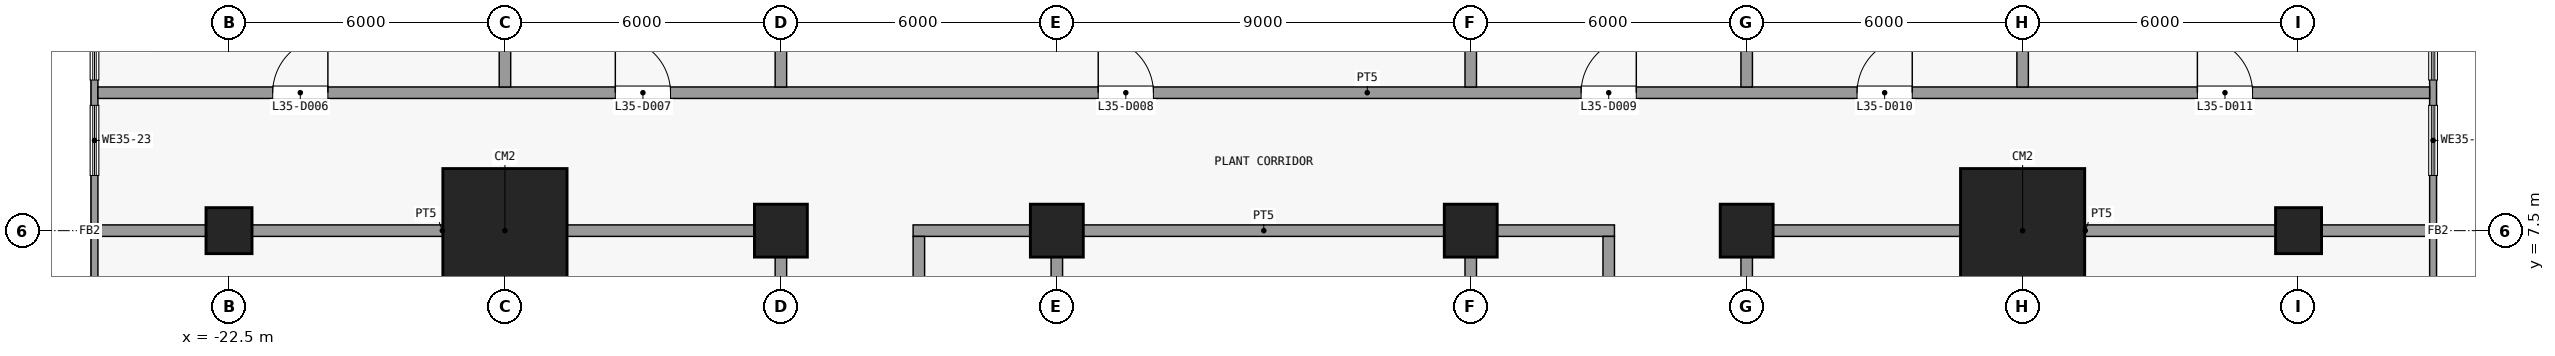
"""IFC4 building model, lengths in metres.
Left out: names, types, materials, properties, quantities, classifications, styles, units other than length and angle.
Written with IfcOpenShell. Run it as: python <this file> out.ifc"""

import sys

from ifc_helpers import new_model, si_unit, direction, frame, frame_2d, origin, origin_2d, place, context, subcontext, project, spatial, rectangle, extrude, element, fill, save


model = new_model("IFC4")
c1 = context("Model", 3, precision=1e-05, world=origin(), true_north=direction((0.0, 1.0)))
c2 = subcontext(c1, "Body", "Model", "MODEL_VIEW")
j1 = project(units=[si_unit("LENGTHUNIT", "METRE"), si_unit("PLANEANGLEUNIT", "RADIAN")], contexts=[c1])
p1 = place(None, origin())
s1 = spatial("IfcSite", under=j1, at=p1, CompositionType="ELEMENT")
p2 = place(p1, origin())
s2 = spatial("IfcBuilding", under=s1, at=p2, CompositionType="ELEMENT")
p3 = place(p2, frame((0.0, 0.0, 143.9)))
s3 = spatial("IfcBuildingStorey", under=s2, at=p3, CompositionType="ELEMENT", Elevation=143.9)
p4 = place(p3, frame((-22.5, 7.5, 0.0), z_axis=(0.0, 0.0, 1.0), x_axis=(1.0, 0.0, 0.0)))
e1 = element("IfcColumn", 1, at=p4, inside=s3, PredefinedType="COLUMN", context=c2, shape_type="SweptSolid", body=[
    extrude(rectangle(XDim=1.0, YDim=1.0, at=origin_2d()), origin(), (0.0, 0.0, 1.0), 5.4),
])
p5 = place(p3, frame((-16.5, 7.5, 0.0), z_axis=(0.0, 0.0, 1.0), x_axis=(1.0, 0.0, 0.0)))
e2 = element("IfcColumn", 2, at=p5, inside=s3, PredefinedType="COLUMN", context=c2, shape_type="SweptSolid", body=[
    extrude(rectangle(XDim=2.7, YDim=2.7, at=origin_2d()), origin(), (0.0, 0.0, 1.0), 5.4),
])
for number, where, z_axis, x_axis in (
    (3, (-10.5, 7.5, 0.0), (0.0, 0.0, 1.0), (1.0, 0.0, 0.0)),
    (4, (-4.5, 7.5, 0.0), (0.0, 0.0, 1.0), (1.0, 0.0, 0.0)),
    (5, (4.5, 7.5, 0.0), (0.0, 0.0, 1.0), (1.0, 0.0, 0.0)),
    (6, (10.5, 7.5, 0.0), (0.0, 0.0, 1.0), (1.0, 0.0, 0.0)),
):
    element("IfcColumn", number, at=place(p3, frame(where, z_axis=z_axis, x_axis=x_axis)), inside=s3, PredefinedType="COLUMN", context=c2, shape_type="SweptSolid", body=[
        extrude(rectangle(XDim=1.15, YDim=1.15, at=origin_2d()), origin(), (0.0, 0.0, 1.0), 5.4),
    ])
p6 = place(p3, frame((16.5, 7.5, 0.0), z_axis=(0.0, 0.0, 1.0), x_axis=(1.0, 0.0, 0.0)))
e7 = element("IfcColumn", 7, at=p6, inside=s3, PredefinedType="COLUMN", context=c2, shape_type="SweptSolid", body=[
    extrude(rectangle(XDim=2.7, YDim=2.7, at=origin_2d()), origin(), (0.0, 0.0, 1.0), 5.4),
])
p7 = place(p3, frame((22.5, 7.5, 0.0), z_axis=(0.0, 0.0, 1.0), x_axis=(1.0, 0.0, 0.0)))
e8 = element("IfcColumn", 8, at=p7, inside=s3, PredefinedType="COLUMN", context=c2, shape_type="SweptSolid", body=[
    extrude(rectangle(XDim=1.0, YDim=1.0, at=origin_2d()), origin(), (0.0, 0.0, 1.0), 5.4),
])
p8 = place(p3, frame((25.425, 18.85, 0.0), z_axis=(0.0, 0.0, 1.0), x_axis=(0.0, -1.0, 0.0)))
e9 = element("IfcWall", 9, at=p8, inside=s3, PredefinedType="SOLIDWALL", context=c2, shape_type="SweptSolid", body=[
    extrude(rectangle(XDim=40.7, YDim=0.15, at=frame_2d((20.35, 0.0))), origin(), (0.0, 0.0, 1.0), 5.0),
])
p9 = place(p8, frame((34.725, 0.0, 1.2)))
e10 = element("IfcOpeningElement", 10, at=p9, cuts=e9, PredefinedType="OPENING", context=c2, shape_type="SweptSolid", body=[
    extrude(rectangle(XDim=3.6, YDim=3.0, at=frame_2d((1.8, 1.5))), frame((0.0, 0.085, 0.0), z_axis=(0.0, -1.0, 0.0), x_axis=(1.0, 0.0, 0.0)), (0.0, 0.0, 1.0), 0.17),
])
p10 = place(p8, frame((27.025, 0.0, 1.2)))
e11 = element("IfcOpeningElement", 11, at=p10, cuts=e9, PredefinedType="OPENING", context=c2, shape_type="SweptSolid", body=[
    extrude(rectangle(XDim=2.625, YDim=3.0, at=frame_2d((1.312, 1.5))), frame((0.0, 0.085, 0.0), z_axis=(0.0, -1.0, 0.0), x_axis=(1.0, 0.0, 0.0)), (0.0, 0.0, 1.0), 0.17),
])
p11 = place(p8, frame((18.55, 0.0, 1.2)))
e12 = element("IfcOpeningElement", 12, at=p11, cuts=e9, PredefinedType="OPENING", context=c2, shape_type="SweptSolid", body=[
    extrude(rectangle(XDim=3.6, YDim=3.0, at=frame_2d((1.8, 1.5))), frame((0.0, 0.085, 0.0), z_axis=(0.0, -1.0, 0.0), x_axis=(1.0, 0.0, 0.0)), (0.0, 0.0, 1.0), 0.17),
])
p12 = place(p8, frame((12.55, 0.0, 1.2)))
e13 = element("IfcOpeningElement", 13, at=p12, cuts=e9, PredefinedType="OPENING", context=c2, shape_type="SweptSolid", body=[
    extrude(rectangle(XDim=3.6, YDim=3.0, at=frame_2d((1.8, 1.5))), frame((0.0, 0.085, 0.0), z_axis=(0.0, -1.0, 0.0), x_axis=(1.0, 0.0, 0.0)), (0.0, 0.0, 1.0), 0.17),
])
p13 = place(p8, frame((8.625, 0.0, 1.2)))
e14 = element("IfcOpeningElement", 14, at=p13, cuts=e9, PredefinedType="OPENING", context=c2, shape_type="SweptSolid", body=[
    extrude(rectangle(XDim=1.525, YDim=3.0, at=frame_2d((0.762, 1.5))), frame((0.0, 0.085, 0.0), z_axis=(0.0, -1.0, 0.0), x_axis=(1.0, 0.0, 0.0)), (0.0, 0.0, 1.0), 0.17),
])
p14 = place(p8, frame((6.55, 0.0, 1.2)))
e15 = element("IfcOpeningElement", 15, at=p14, cuts=e9, PredefinedType="OPENING", context=c2, shape_type="SweptSolid", body=[
    extrude(rectangle(XDim=1.525, YDim=3.0, at=frame_2d((0.762, 1.5))), frame((0.0, 0.085, 0.0), z_axis=(0.0, -1.0, 0.0), x_axis=(1.0, 0.0, 0.0)), (0.0, 0.0, 1.0), 0.17),
])
p15 = place(p8, frame((0.875, 0.0, 1.2)))
e16 = element("IfcOpeningElement", 16, at=p15, cuts=e9, PredefinedType="OPENING", context=c2, shape_type="SweptSolid", body=[
    extrude(rectangle(XDim=3.6, YDim=3.0, at=frame_2d((1.8, 1.5))), frame((0.0, 0.085, 0.0), z_axis=(0.0, -1.0, 0.0), x_axis=(1.0, 0.0, 0.0)), (0.0, 0.0, 1.0), 0.17),
])
p16 = place(p3, frame((-25.425, -21.85, 0.0), z_axis=(0.0, 0.0, 1.0), x_axis=(0.0, 1.0, 0.0)))
e17 = element("IfcWall", 17, at=p16, inside=s3, PredefinedType="SOLIDWALL", context=c2, shape_type="SweptSolid", body=[
    extrude(rectangle(XDim=40.7, YDim=0.15, at=frame_2d((20.35, 0.0))), origin(), (0.0, 0.0, 1.0), 5.0),
])
p17 = place(p16, frame((2.375, 0.0, 1.2)))
e18 = element("IfcOpeningElement", 18, at=p17, cuts=e17, PredefinedType="OPENING", context=c2, shape_type="SweptSolid", body=[
    extrude(rectangle(XDim=3.6, YDim=3.0, at=frame_2d((1.8, 1.5))), frame((0.0, 0.085, 0.0), z_axis=(0.0, -1.0, 0.0), x_axis=(1.0, 0.0, 0.0)), (0.0, 0.0, 1.0), 0.17),
])
p18 = place(p16, frame((11.05, 0.0, 1.2)))
e19 = element("IfcOpeningElement", 19, at=p18, cuts=e17, PredefinedType="OPENING", context=c2, shape_type="SweptSolid", body=[
    extrude(rectangle(XDim=2.625, YDim=3.0, at=frame_2d((1.312, 1.5))), frame((0.0, 0.085, 0.0), z_axis=(0.0, -1.0, 0.0), x_axis=(1.0, 0.0, 0.0)), (0.0, 0.0, 1.0), 0.17),
])
p19 = place(p16, frame((18.55, 0.0, 1.2)))
e20 = element("IfcOpeningElement", 20, at=p19, cuts=e17, PredefinedType="OPENING", context=c2, shape_type="SweptSolid", body=[
    extrude(rectangle(XDim=3.6, YDim=3.0, at=frame_2d((1.8, 1.5))), frame((0.0, 0.085, 0.0), z_axis=(0.0, -1.0, 0.0), x_axis=(1.0, 0.0, 0.0)), (0.0, 0.0, 1.0), 0.17),
])
p20 = place(p16, frame((24.55, 0.0, 1.2)))
e21 = element("IfcOpeningElement", 21, at=p20, cuts=e17, PredefinedType="OPENING", context=c2, shape_type="SweptSolid", body=[
    extrude(rectangle(XDim=3.6, YDim=3.0, at=frame_2d((1.8, 1.5))), frame((0.0, 0.085, 0.0), z_axis=(0.0, -1.0, 0.0), x_axis=(1.0, 0.0, 0.0)), (0.0, 0.0, 1.0), 0.17),
])
p21 = place(p16, frame((30.55, 0.0, 1.2)))
e22 = element("IfcOpeningElement", 22, at=p21, cuts=e17, PredefinedType="OPENING", context=c2, shape_type="SweptSolid", body=[
    extrude(rectangle(XDim=1.525, YDim=3.0, at=frame_2d((0.762, 1.5))), frame((0.0, 0.085, 0.0), z_axis=(0.0, -1.0, 0.0), x_axis=(1.0, 0.0, 0.0)), (0.0, 0.0, 1.0), 0.17),
])
p22 = place(p16, frame((32.625, 0.0, 1.2)))
e23 = element("IfcOpeningElement", 23, at=p22, cuts=e17, PredefinedType="OPENING", context=c2, shape_type="SweptSolid", body=[
    extrude(rectangle(XDim=1.525, YDim=3.0, at=frame_2d((0.762, 1.5))), frame((0.0, 0.085, 0.0), z_axis=(0.0, -1.0, 0.0), x_axis=(1.0, 0.0, 0.0)), (0.0, 0.0, 1.0), 0.17),
])
p23 = place(p16, frame((36.225, 0.0, 1.2)))
e24 = element("IfcOpeningElement", 24, at=p23, cuts=e17, PredefinedType="OPENING", context=c2, shape_type="SweptSolid", body=[
    extrude(rectangle(XDim=3.6, YDim=3.0, at=frame_2d((1.8, 1.5))), frame((0.0, 0.085, 0.0), z_axis=(0.0, -1.0, 0.0), x_axis=(1.0, 0.0, 0.0)), (0.0, 0.0, 1.0), 0.17),
])
p24 = place(p3, frame((-25.35, 7.5, 0.0), z_axis=(0.0, 0.0, 1.0), x_axis=(1.0, 0.0, 0.0)))
e25 = element("IfcWall", 25, at=p24, inside=s3, PredefinedType="PARTITIONING", context=c2, shape_type="SweptSolid", body=[
    extrude(rectangle(XDim=14.975, YDim=0.25, at=frame_2d((7.488, 0.0))), origin(), (0.0, 0.0, 1.0), 5.0),
])
p25 = place(p3, frame((-7.625, 7.5, 0.0), z_axis=(0.0, 0.0, 1.0), x_axis=(1.0, 0.0, 0.0)))
e26 = element("IfcWall", 26, at=p25, inside=s3, PredefinedType="PARTITIONING", context=c2, shape_type="SweptSolid", body=[
    extrude(rectangle(XDim=15.25, YDim=0.25, at=frame_2d((7.625, 0.0))), origin(), (0.0, 0.0, 1.0), 5.0),
])
p26 = place(p3, frame((10.375, 7.5, 0.0), z_axis=(0.0, 0.0, 1.0), x_axis=(1.0, 0.0, 0.0)))
e27 = element("IfcWall", 27, at=p26, inside=s3, PredefinedType="PARTITIONING", context=c2, shape_type="SweptSolid", body=[
    extrude(rectangle(XDim=14.975, YDim=0.25, at=frame_2d((7.488, 0.0))), origin(), (0.0, 0.0, 1.0), 5.0),
])
p27 = place(p3, frame((-25.35, 10.5, 0.0), z_axis=(0.0, 0.0, 1.0), x_axis=(1.0, 0.0, 0.0)))
e28 = element("IfcWall", 28, at=p27, inside=s3, PredefinedType="PARTITIONING", context=c2, shape_type="SweptSolid", body=[
    extrude(rectangle(XDim=50.7, YDim=0.25, at=frame_2d((25.35, 0.0))), origin(), (0.0, 0.0, 1.0), 5.0),
])
p28 = place(p27, frame((3.8, 0.0, 0.0)))
e29 = element("IfcOpeningElement", 29, at=p28, cuts=e28, PredefinedType="OPENING", context=c2, shape_type="SweptSolid", body=[
    extrude(rectangle(XDim=1.2, YDim=2.1, at=frame_2d((0.6, 1.05))), frame((0.0, 0.135, 0.0), z_axis=(0.0, -1.0, 0.0), x_axis=(1.0, 0.0, 0.0)), (0.0, 0.0, 1.0), 0.27),
])
p29 = place(p27, frame((11.25, 0.0, 0.0)))
e30 = element("IfcOpeningElement", 30, at=p29, cuts=e28, PredefinedType="OPENING", context=c2, shape_type="SweptSolid", body=[
    extrude(rectangle(XDim=1.2, YDim=2.1, at=frame_2d((0.6, 1.05))), frame((0.0, 0.135, 0.0), z_axis=(0.0, -1.0, 0.0), x_axis=(1.0, 0.0, 0.0)), (0.0, 0.0, 1.0), 0.27),
])
p30 = place(p27, frame((21.75, 0.0, 0.0)))
e31 = element("IfcOpeningElement", 31, at=p30, cuts=e28, PredefinedType="OPENING", context=c2, shape_type="SweptSolid", body=[
    extrude(rectangle(XDim=1.2, YDim=2.1, at=frame_2d((0.6, 1.05))), frame((0.0, 0.135, 0.0), z_axis=(0.0, -1.0, 0.0), x_axis=(1.0, 0.0, 0.0)), (0.0, 0.0, 1.0), 0.27),
])
p31 = place(p27, frame((32.25, 0.0, 0.0)))
e32 = element("IfcOpeningElement", 32, at=p31, cuts=e28, PredefinedType="OPENING", context=c2, shape_type="SweptSolid", body=[
    extrude(rectangle(XDim=1.2, YDim=2.1, at=frame_2d((0.6, 1.05))), frame((0.0, 0.135, 0.0), z_axis=(0.0, -1.0, 0.0), x_axis=(1.0, 0.0, 0.0)), (0.0, 0.0, 1.0), 0.27),
])
p32 = place(p27, frame((38.25, 0.0, 0.0)))
e33 = element("IfcOpeningElement", 33, at=p32, cuts=e28, PredefinedType="OPENING", context=c2, shape_type="SweptSolid", body=[
    extrude(rectangle(XDim=1.2, YDim=2.1, at=frame_2d((0.6, 1.05))), frame((0.0, 0.135, 0.0), z_axis=(0.0, -1.0, 0.0), x_axis=(1.0, 0.0, 0.0)), (0.0, 0.0, 1.0), 0.27),
])
p33 = place(p27, frame((45.65, 0.0, 0.0)))
e34 = element("IfcOpeningElement", 34, at=p33, cuts=e28, PredefinedType="OPENING", context=c2, shape_type="SweptSolid", body=[
    extrude(rectangle(XDim=1.2, YDim=2.1, at=frame_2d((0.6, 1.05))), frame((0.0, 0.135, 0.0), z_axis=(0.0, -1.0, 0.0), x_axis=(1.0, 0.0, 0.0)), (0.0, 0.0, 1.0), 0.27),
])
p34 = place(p3, frame((-16.5, 10.625, 0.0), z_axis=(0.0, 0.0, 1.0), x_axis=(0.0, 1.0, 0.0)))
e35 = element("IfcWall", 35, at=p34, inside=s3, PredefinedType="PARTITIONING", context=c2, shape_type="SweptSolid", body=[
    extrude(rectangle(XDim=11.725, YDim=0.25, at=frame_2d((5.863, 0.0))), origin(), (0.0, 0.0, 1.0), 5.0),
])
p35 = place(p3, frame((-10.5, -4.375, 0.0), z_axis=(0.0, 0.0, 1.0), x_axis=(0.0, 1.0, 0.0)))
e36 = element("IfcWall", 36, at=p35, inside=s3, PredefinedType="PARTITIONING", context=c2, shape_type="SweptSolid", body=[
    extrude(rectangle(XDim=11.75, YDim=0.25, at=frame_2d((5.875, 0.0))), origin(), (0.0, 0.0, 1.0), 5.0),
])
p36 = place(p3, frame((-10.5, 10.625, 0.0), z_axis=(0.0, 0.0, 1.0), x_axis=(0.0, 1.0, 0.0)))
e37 = element("IfcWall", 37, at=p36, inside=s3, PredefinedType="PARTITIONING", context=c2, shape_type="SweptSolid", body=[
    extrude(rectangle(XDim=11.725, YDim=0.25, at=frame_2d((5.863, 0.0))), origin(), (0.0, 0.0, 1.0), 5.0),
])
p37 = place(p3, frame((-7.5, -4.375, 0.0), z_axis=(0.0, 0.0, 1.0), x_axis=(0.0, 1.0, 0.0)))
e38 = element("IfcWall", 38, at=p37, inside=s3, PredefinedType="PARTITIONING", context=c2, shape_type="SweptSolid", body=[
    extrude(rectangle(XDim=11.75, YDim=0.25, at=frame_2d((5.875, 0.0))), origin(), (0.0, 0.0, 1.0), 5.0),
])
p38 = place(p37, frame((5.3, 0.0, 0.0)))
e39 = element("IfcOpeningElement", 39, at=p38, cuts=e38, PredefinedType="OPENING", context=c2, shape_type="SweptSolid", body=[
    extrude(rectangle(XDim=1.2, YDim=2.1, at=frame_2d((0.6, 1.05))), frame((0.0, 0.135, 0.0), z_axis=(0.0, -1.0, 0.0), x_axis=(1.0, 0.0, 0.0)), (0.0, 0.0, 1.0), 0.27),
])
for number, where, z_axis, x_axis in (
    (40, (-4.5, -4.375, 0.0), (0.0, 0.0, 1.0), (0.0, 1.0, 0.0)),
    (41, (4.5, -4.375, 0.0), (0.0, 0.0, 1.0), (0.0, 1.0, 0.0)),
):
    element("IfcWall", number, at=place(p3, frame(where, z_axis=z_axis, x_axis=x_axis)), inside=s3, PredefinedType="PARTITIONING", context=c2, shape_type="SweptSolid", body=[
        extrude(rectangle(XDim=11.75, YDim=0.25, at=frame_2d((5.875, 0.0))), origin(), (0.0, 0.0, 1.0), 5.0),
    ])
p39 = place(p3, frame((4.5, 10.625, 0.0), z_axis=(0.0, 0.0, 1.0), x_axis=(0.0, 1.0, 0.0)))
e42 = element("IfcWall", 42, at=p39, inside=s3, PredefinedType="PARTITIONING", context=c2, shape_type="SweptSolid", body=[
    extrude(rectangle(XDim=11.725, YDim=0.25, at=frame_2d((5.863, 0.0))), origin(), (0.0, 0.0, 1.0), 5.0),
])
p40 = place(p3, frame((7.5, -4.375, 0.0), z_axis=(0.0, 0.0, 1.0), x_axis=(0.0, 1.0, 0.0)))
e43 = element("IfcWall", 43, at=p40, inside=s3, PredefinedType="PARTITIONING", context=c2, shape_type="SweptSolid", body=[
    extrude(rectangle(XDim=11.75, YDim=0.25, at=frame_2d((5.875, 0.0))), origin(), (0.0, 0.0, 1.0), 5.0),
])
p41 = place(p40, frame((5.3, 0.0, 0.0)))
e44 = element("IfcOpeningElement", 44, at=p41, cuts=e43, PredefinedType="OPENING", context=c2, shape_type="SweptSolid", body=[
    extrude(rectangle(XDim=1.2, YDim=2.1, at=frame_2d((0.6, 1.05))), frame((0.0, 0.135, 0.0), z_axis=(0.0, -1.0, 0.0), x_axis=(1.0, 0.0, 0.0)), (0.0, 0.0, 1.0), 0.27),
])
p42 = place(p3, frame((10.5, -4.375, 0.0), z_axis=(0.0, 0.0, 1.0), x_axis=(0.0, 1.0, 0.0)))
e45 = element("IfcWall", 45, at=p42, inside=s3, PredefinedType="PARTITIONING", context=c2, shape_type="SweptSolid", body=[
    extrude(rectangle(XDim=11.75, YDim=0.25, at=frame_2d((5.875, 0.0))), origin(), (0.0, 0.0, 1.0), 5.0),
])
for number, where, z_axis, x_axis in (
    (46, (10.5, 10.625, 0.0), (0.0, 0.0, 1.0), (0.0, 1.0, 0.0)),
    (47, (16.5, 10.625, 0.0), (0.0, 0.0, 1.0), (0.0, 1.0, 0.0)),
):
    element("IfcWall", number, at=place(p3, frame(where, z_axis=z_axis, x_axis=x_axis)), inside=s3, PredefinedType="PARTITIONING", context=c2, shape_type="SweptSolid", body=[
        extrude(rectangle(XDim=11.725, YDim=0.25, at=frame_2d((5.863, 0.0))), origin(), (0.0, 0.0, 1.0), 5.0),
    ])
p43 = place(p13, origin())
e48 = element("IfcWindow", 48, at=p43, inside=s3, PartitioningType="SINGLE_PANEL", PredefinedType="WINDOW", context=c2, shape_type="SweptSolid", body=[
    extrude(rectangle(XDim=1.525, YDim=3.0, at=frame_2d((0.762, 1.5))), frame((0.0, 0.03, 0.0), z_axis=(0.0, -1.0, 0.0), x_axis=(1.0, 0.0, 0.0)), (0.0, 0.0, 1.0), 0.06),
])
fill(e14, e48)
p44 = place(p14, origin())
e49 = element("IfcWindow", 49, at=p44, inside=s3, PartitioningType="SINGLE_PANEL", PredefinedType="WINDOW", context=c2, shape_type="SweptSolid", body=[
    extrude(rectangle(XDim=1.525, YDim=3.0, at=frame_2d((0.762, 1.5))), frame((0.0, 0.03, 0.0), z_axis=(0.0, -1.0, 0.0), x_axis=(1.0, 0.0, 0.0)), (0.0, 0.0, 1.0), 0.06),
])
fill(e15, e49)
p45 = place(p21, origin())
e50 = element("IfcWindow", 50, at=p45, inside=s3, PartitioningType="SINGLE_PANEL", PredefinedType="WINDOW", context=c2, shape_type="SweptSolid", body=[
    extrude(rectangle(XDim=1.525, YDim=3.0, at=frame_2d((0.762, 1.5))), frame((0.0, 0.03, 0.0), z_axis=(0.0, -1.0, 0.0), x_axis=(1.0, 0.0, 0.0)), (0.0, 0.0, 1.0), 0.06),
])
fill(e22, e50)
p46 = place(p22, origin())
e51 = element("IfcWindow", 51, at=p46, inside=s3, PartitioningType="SINGLE_PANEL", PredefinedType="WINDOW", context=c2, shape_type="SweptSolid", body=[
    extrude(rectangle(XDim=1.525, YDim=3.0, at=frame_2d((0.762, 1.5))), frame((0.0, 0.03, 0.0), z_axis=(0.0, -1.0, 0.0), x_axis=(1.0, 0.0, 0.0)), (0.0, 0.0, 1.0), 0.06),
])
fill(e23, e51)
p47 = place(p28, origin())
e52 = element("IfcDoor", 52, at=p47, inside=s3, OperationType="SINGLE_SWING_LEFT", PredefinedType="DOOR", context=c2, shape_type="SweptSolid", body=[
    extrude(rectangle(XDim=1.2, YDim=2.1, at=frame_2d((0.6, 1.05))), frame((0.0, 0.025, 0.0), z_axis=(0.0, -1.0, 0.0), x_axis=(1.0, 0.0, 0.0)), (0.0, 0.0, 1.0), 0.05),
])
fill(e29, e52)
p48 = place(p29, origin())
e53 = element("IfcDoor", 53, at=p48, inside=s3, OperationType="SINGLE_SWING_RIGHT", PredefinedType="DOOR", context=c2, shape_type="SweptSolid", body=[
    extrude(rectangle(XDim=1.2, YDim=2.1, at=frame_2d((0.6, 1.05))), frame((0.0, 0.025, 0.0), z_axis=(0.0, -1.0, 0.0), x_axis=(1.0, 0.0, 0.0)), (0.0, 0.0, 1.0), 0.05),
])
fill(e30, e53)
p49 = place(p30, origin())
e54 = element("IfcDoor", 54, at=p49, inside=s3, OperationType="SINGLE_SWING_RIGHT", PredefinedType="DOOR", context=c2, shape_type="SweptSolid", body=[
    extrude(rectangle(XDim=1.2, YDim=2.1, at=frame_2d((0.6, 1.05))), frame((0.0, 0.025, 0.0), z_axis=(0.0, -1.0, 0.0), x_axis=(1.0, 0.0, 0.0)), (0.0, 0.0, 1.0), 0.05),
])
fill(e31, e54)
p50 = place(p31, origin())
e55 = element("IfcDoor", 55, at=p50, inside=s3, OperationType="SINGLE_SWING_LEFT", PredefinedType="DOOR", context=c2, shape_type="SweptSolid", body=[
    extrude(rectangle(XDim=1.2, YDim=2.1, at=frame_2d((0.6, 1.05))), frame((0.0, 0.025, 0.0), z_axis=(0.0, -1.0, 0.0), x_axis=(1.0, 0.0, 0.0)), (0.0, 0.0, 1.0), 0.05),
])
fill(e32, e55)
p51 = place(p32, origin())
e56 = element("IfcDoor", 56, at=p51, inside=s3, OperationType="SINGLE_SWING_LEFT", PredefinedType="DOOR", context=c2, shape_type="SweptSolid", body=[
    extrude(rectangle(XDim=1.2, YDim=2.1, at=frame_2d((0.6, 1.05))), frame((0.0, 0.025, 0.0), z_axis=(0.0, -1.0, 0.0), x_axis=(1.0, 0.0, 0.0)), (0.0, 0.0, 1.0), 0.05),
])
fill(e33, e56)
p52 = place(p33, origin())
e57 = element("IfcDoor", 57, at=p52, inside=s3, OperationType="SINGLE_SWING_RIGHT", PredefinedType="DOOR", context=c2, shape_type="SweptSolid", body=[
    extrude(rectangle(XDim=1.2, YDim=2.1, at=frame_2d((0.6, 1.05))), frame((0.0, 0.025, 0.0), z_axis=(0.0, -1.0, 0.0), x_axis=(1.0, 0.0, 0.0)), (0.0, 0.0, 1.0), 0.05),
])
fill(e34, e57)
save(model, sys.argv[1])
